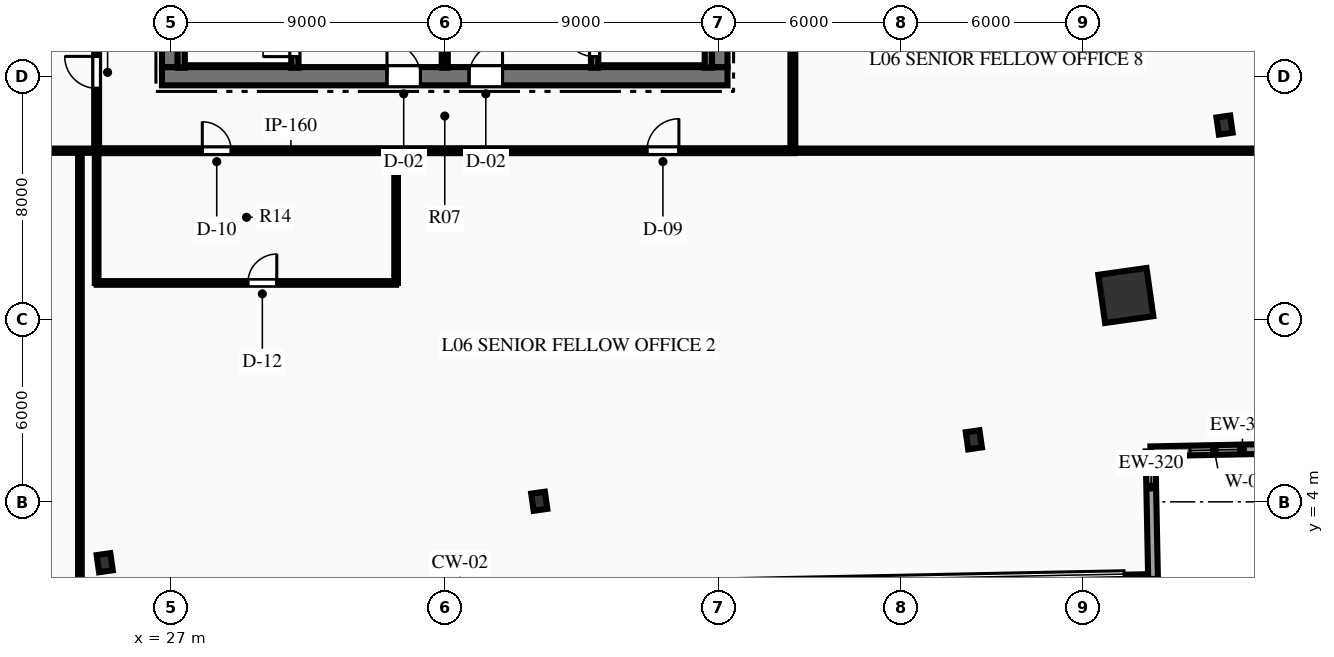
"""IFC4 building model, lengths in metres.
Left out: names, types, materials, properties, quantities, classifications, styles, units other than length and angle.
Written with IfcOpenShell. Run it as: python <this file> out.ifc"""

import sys

from ifc_helpers import new_model, si_unit, direction, frame, frame_2d, origin, origin_2d, place, context, subcontext, project, spatial, rectangle, hollow_rectangle, i_section, extrude, element, fill, save


model = new_model("IFC4")
c1 = context("Model", 3, precision=1e-05, world=origin(), true_north=direction((0.0, 1.0)))
c2 = subcontext(c1, "Body", "Model", "MODEL_VIEW")
j1 = project(units=[si_unit("LENGTHUNIT", "METRE"), si_unit("PLANEANGLEUNIT", "RADIAN")], contexts=[c1])
p1 = place(None, origin())
s1 = spatial("IfcSite", under=j1, at=p1, CompositionType="ELEMENT")
p2 = place(p1, origin())
s2 = spatial("IfcBuilding", under=s1, at=p2, CompositionType="ELEMENT")
p3 = place(p2, frame((0.0, 0.0, 32.7)))
s3 = spatial("IfcBuildingStorey", under=s2, at=p3, CompositionType="ELEMENT", Elevation=32.7)
p4 = place(p3, frame((26.7, 18.0, 0.0), z_axis=(0.0, 0.0, 1.0), x_axis=(1.0, 0.0, 0.0)))
e1 = element("IfcWall", 1, at=p4, inside=s3, PredefinedType="SHEAR", context=c2, shape_type="SweptSolid", body=[
    extrude(rectangle(XDim=18.6, YDim=0.6, at=frame_2d((9.3, 0.0))), origin(), (0.0, 0.0, 1.0), 3.75),
])
p5 = place(p4, frame((7.4, 0.0, 0.0)))
e2 = element("IfcOpeningElement", 2, at=p5, cuts=e1, PredefinedType="OPENING", context=c2, shape_type="SweptSolid", body=[
    extrude(rectangle(XDim=1.1, YDim=2.15, at=frame_2d((0.55, 1.075))), frame((0.0, 0.31, 0.0), z_axis=(0.0, -1.0, 0.0), x_axis=(1.0, 0.0, 0.0)), (0.0, 0.0, 1.0), 0.62),
])
p6 = place(p4, frame((10.1, 0.0, 0.0)))
e3 = element("IfcOpeningElement", 3, at=p6, cuts=e1, PredefinedType="OPENING", context=c2, shape_type="SweptSolid", body=[
    extrude(rectangle(XDim=1.1, YDim=2.15, at=frame_2d((0.55, 1.075))), frame((0.0, 0.31, 0.0), z_axis=(0.0, -1.0, 0.0), x_axis=(1.0, 0.0, 0.0)), (0.0, 0.0, 1.0), 0.62),
])
p7 = place(p3, frame((27.0, 18.3, 0.0), z_axis=(0.0, 0.0, 1.0), x_axis=(0.0, 1.0, 0.0)))
e4 = element("IfcWall", 4, at=p7, inside=s3, PredefinedType="SHEAR", context=c2, shape_type="SweptSolid", body=[
    extrude(rectangle(XDim=15.4, YDim=0.6, at=frame_2d((7.7, 0.0))), origin(), (0.0, 0.0, 1.0), 3.75),
])
p8 = place(p7, frame((9.94, 0.0, 0.0)))
e5 = element("IfcOpeningElement", 5, at=p8, cuts=e4, PredefinedType="OPENING", context=c2, shape_type="SweptSolid", body=[
    extrude(rectangle(XDim=1.4, YDim=2.2, at=frame_2d((0.7, 1.1))), frame((0.0, 0.31, 0.0), z_axis=(0.0, -1.0, 0.0), x_axis=(1.0, 0.0, 0.0)), (0.0, 0.0, 1.0), 0.62),
])
p9 = place(p3, frame((45.0, 18.3, 0.0), z_axis=(0.0, 0.0, 1.0), x_axis=(0.0, 1.0, 0.0)))
e6 = element("IfcWall", 6, at=p9, inside=s3, PredefinedType="SHEAR", context=c2, shape_type="SweptSolid", body=[
    extrude(rectangle(XDim=15.4, YDim=0.6, at=frame_2d((7.7, 0.0))), origin(), (0.0, 0.0, 1.0), 3.75),
])
p10 = place(p9, frame((9.94, 0.0, 0.0)))
e7 = element("IfcOpeningElement", 7, at=p10, cuts=e6, PredefinedType="OPENING", context=c2, shape_type="SweptSolid", body=[
    extrude(rectangle(XDim=1.4, YDim=2.2, at=frame_2d((0.7, 1.1))), frame((0.0, 0.31, 0.0), z_axis=(0.0, -1.0, 0.0), x_axis=(1.0, 0.0, 0.0)), (0.0, 0.0, 1.0), 0.62),
])
p11 = place(p3, frame((31.07, 18.28, 0.0), z_axis=(0.0, 0.0, 1.0), x_axis=(0.0, 1.0, 0.0)))
e8 = element("IfcWall", 8, at=p11, inside=s3, PredefinedType="SHEAR", context=c2, shape_type="SweptSolid", body=[
    extrude(rectangle(XDim=8.26, YDim=0.24, at=frame_2d((4.13, 0.0))), origin(), (0.0, 0.0, 1.0), 3.75),
])
p12 = place(p11, frame((0.365, 0.0, 0.0)))
e9 = element("IfcOpeningElement", 9, at=p12, cuts=e8, PredefinedType="OPENING", context=c2, shape_type="SweptSolid", body=[
    extrude(rectangle(XDim=1.05, YDim=2.15, at=frame_2d((0.525, 1.075))), frame((0.0, 0.13, 0.0), z_axis=(0.0, -1.0, 0.0), x_axis=(1.0, 0.0, 0.0)), (0.0, 0.0, 1.0), 0.26),
])
p13 = place(p3, frame((27.33, 18.28, 0.0), z_axis=(0.0, 0.0, 1.0), x_axis=(0.0, 1.0, 0.0)))
e10 = element("IfcWall", 10, at=p13, inside=s3, PredefinedType="SHEAR", context=c2, shape_type="SweptSolid", body=[
    extrude(rectangle(XDim=8.26, YDim=0.24, at=frame_2d((4.13, 0.0))), origin(), (0.0, 0.0, 1.0), 3.75),
])
p14 = place(p3, frame((40.93, 18.28, 0.0), z_axis=(0.0, 0.0, 1.0), x_axis=(0.0, 1.0, 0.0)))
e11 = element("IfcWall", 11, at=p14, inside=s3, PredefinedType="SHEAR", context=c2, shape_type="SweptSolid", body=[
    extrude(rectangle(XDim=8.26, YDim=0.24, at=frame_2d((4.13, 0.0))), origin(), (0.0, 0.0, 1.0), 3.75),
])
p15 = place(p14, frame((0.365, 0.0, 0.0)))
e12 = element("IfcOpeningElement", 12, at=p15, cuts=e11, PredefinedType="OPENING", context=c2, shape_type="SweptSolid", body=[
    extrude(rectangle(XDim=1.05, YDim=2.15, at=frame_2d((0.525, 1.075))), frame((0.0, 0.13, 0.0), z_axis=(0.0, -1.0, 0.0), x_axis=(1.0, 0.0, 0.0)), (0.0, 0.0, 1.0), 0.26),
])
p16 = place(p3, frame((44.67, 18.28, 0.0), z_axis=(0.0, 0.0, 1.0), x_axis=(0.0, 1.0, 0.0)))
e13 = element("IfcWall", 13, at=p16, inside=s3, PredefinedType="SHEAR", context=c2, shape_type="SweptSolid", body=[
    extrude(rectangle(XDim=8.26, YDim=0.24, at=frame_2d((4.13, 0.0))), origin(), (0.0, 0.0, 1.0), 3.75),
])
p17 = place(p3, frame((58.401, 10.787, 0.0), z_axis=(0.0, 0.0, 1.0), x_axis=(0.990146240249, 0.140037219771, 0.0)))
e14 = element("IfcColumn", 14, at=p17, inside=s3, PredefinedType="COLUMN", context=c2, shape_type="SweptSolid", body=[
    extrude(hollow_rectangle(XDim=1.6, YDim=1.6, WallThickness=0.08, at=origin_2d()), origin(), (0.0, 0.0, 1.0), 3.75),
])
for number, where, z_axis, x_axis in (
    (15, (24.815, 1.997, 0.0), (0.0, 0.0, 1.0), (0.99, 0.14, 0.0)),
    (16, (39.109, 4.019, 0.0), (0.0, 0.0, 1.0), (0.99, 0.14, 0.0)),
    (17, (53.403, 6.04, 0.0), (0.0, 0.0, 1.0), (0.99, 0.14, 0.0)),
    (18, (61.648, 16.393, 0.0), (0.0, 0.0, 1.0), (0.99, 0.14, 0.0)),
):
    element("IfcColumn", number, at=place(p3, frame(where, z_axis=z_axis, x_axis=x_axis)), inside=s3, PredefinedType="COLUMN", context=c2, shape_type="SweptSolid", body=[
        extrude(i_section(OverallWidth=0.454, OverallDepth=0.569, WebThickness=0.078, FlangeThickness=0.125, at=origin_2d()), origin(), (0.0, 0.0, 1.0), 3.75),
    ])
p18 = place(p3, frame((59.297, 1.463, 0.0), z_axis=(0.0, 0.0, 1.0), x_axis=(-0.999798429426, -0.020077363305, 0.0)))
e19 = element("IfcWall", 19, at=p18, inside=s3, PredefinedType="STANDARD", context=c2, shape_type="SweptSolid", body=[
    extrude(rectangle(XDim=0.9, YDim=0.32, at=frame_2d((0.45, 0.0))), origin(), (0.0, 0.0, 1.0), 3.44),
])
p19 = place(p3, frame((59.213, 5.662, 0.0), z_axis=(0.0, 0.0, 1.0), x_axis=(0.020054105767, -0.9997988962, 0.0)))
e20 = element("IfcWall", 20, at=p19, inside=s3, PredefinedType="STANDARD", context=c2, shape_type="SweptSolid", body=[
    extrude(rectangle(XDim=4.2, YDim=0.32, at=frame_2d((2.1, 0.0))), origin(), (0.0, 0.0, 1.0), 3.44),
])
p20 = place(p3, frame((63.412, 5.746, 0.0), z_axis=(0.0, 0.0, 1.0), x_axis=(-0.9997988962, -0.020054105767, 0.0)))
e21 = element("IfcWall", 21, at=p20, inside=s3, PredefinedType="STANDARD", context=c2, shape_type="SweptSolid", body=[
    extrude(rectangle(XDim=4.2, YDim=0.32, at=frame_2d((2.1, 0.0))), origin(), (0.0, 0.0, 1.0), 3.44),
])
p21 = place(p20, frame((1.3, 0.0, 0.85)))
e22 = element("IfcOpeningElement", 22, at=p21, cuts=e21, PredefinedType="OPENING", context=c2, shape_type="SweptSolid", body=[
    extrude(rectangle(XDim=1.6, YDim=2.1, at=frame_2d((0.8, 1.05))), frame((0.0, 0.17, 0.0), z_axis=(0.0, -1.0, 0.0), x_axis=(1.0, 0.0, 0.0)), (0.0, 0.0, 1.0), 0.34),
])
p22 = place(p3, frame((36.0, 18.28, 0.0), z_axis=(0.0, 0.0, 1.0), x_axis=(0.0, 1.0, 0.0)))
e23 = element("IfcWall", 23, at=p22, inside=s3, PredefinedType="PARTITIONING", context=c2, shape_type="SweptSolid", body=[
    extrude(rectangle(XDim=3.77, YDim=0.2, at=frame_2d((1.885, 0.0))), origin(), (0.0, 0.0, 1.0), 3.44),
])
p23 = place(p3, frame((24.5, 15.55, 0.0), z_axis=(0.0, 0.0, 1.0), x_axis=(1.0, 0.0, 0.0)))
e24 = element("IfcWall", 24, at=p23, inside=s3, PredefinedType="PARTITIONING", context=c2, shape_type="SweptSolid", body=[
    extrude(rectangle(XDim=23.0, YDim=0.16, at=frame_2d((11.5, 0.0))), origin(), (0.0, 0.0, 1.0), 3.44),
])
p24 = place(p23, frame((3.525, 0.0, 0.0)))
e25 = element("IfcOpeningElement", 25, at=p24, cuts=e24, PredefinedType="OPENING", context=c2, shape_type="SweptSolid", body=[
    extrude(rectangle(XDim=0.95, YDim=2.15, at=frame_2d((0.475, 1.075))), frame((0.0, 0.09, 0.0), z_axis=(0.0, -1.0, 0.0), x_axis=(1.0, 0.0, 0.0)), (0.0, 0.0, 1.0), 0.18),
])
p25 = place(p23, frame((18.151, 0.0, 0.0)))
e26 = element("IfcOpeningElement", 26, at=p25, cuts=e24, PredefinedType="OPENING", context=c2, shape_type="SweptSolid", body=[
    extrude(rectangle(XDim=1.05, YDim=2.15, at=frame_2d((0.525, 1.075))), frame((0.0, 0.09, 0.0), z_axis=(0.0, -1.0, 0.0), x_axis=(1.0, 0.0, 0.0)), (0.0, 0.0, 1.0), 0.18),
])
p26 = place(p3, frame((24.55, 15.55, 0.0), z_axis=(0.0, 0.0, 1.0), x_axis=(0.0, 1.0, 0.0)))
e27 = element("IfcWall", 27, at=p26, inside=s3, PredefinedType="PARTITIONING", context=c2, shape_type="SweptSolid", body=[
    extrude(rectangle(XDim=20.9, YDim=0.16, at=frame_2d((10.45, 0.0))), origin(), (0.0, 0.0, 1.0), 3.44),
])
p27 = place(p26, frame((2.052, 0.0, 0.0)))
e28 = element("IfcOpeningElement", 28, at=p27, cuts=e27, PredefinedType="OPENING", context=c2, shape_type="SweptSolid", body=[
    extrude(rectangle(XDim=1.05, YDim=2.15, at=frame_2d((0.525, 1.075))), frame((0.0, 0.09, 0.0), z_axis=(0.0, -1.0, 0.0), x_axis=(1.0, 0.0, 0.0)), (0.0, 0.0, 1.0), 0.18),
])
p28 = place(p26, frame((15.645, 0.0, 0.0)))
e29 = element("IfcOpeningElement", 29, at=p28, cuts=e27, PredefinedType="OPENING", context=c2, shape_type="SweptSolid", body=[
    extrude(rectangle(XDim=1.05, YDim=2.15, at=frame_2d((0.525, 1.075))), frame((0.0, 0.09, 0.0), z_axis=(0.0, -1.0, 0.0), x_axis=(1.0, 0.0, 0.0)), (0.0, 0.0, 1.0), 0.18),
])
p29 = place(p3, frame((47.45, 15.55, 0.0), z_axis=(0.0, 0.0, 1.0), x_axis=(0.0, 1.0, 0.0)))
e30 = element("IfcWall", 30, at=p29, inside=s3, PredefinedType="PARTITIONING", context=c2, shape_type="SweptSolid", body=[
    extrude(rectangle(XDim=20.9, YDim=0.16, at=frame_2d((10.45, 0.0))), origin(), (0.0, 0.0, 1.0), 3.44),
])
p30 = place(p29, frame((3.747, 0.0, 0.0)))
e31 = element("IfcOpeningElement", 31, at=p30, cuts=e30, PredefinedType="OPENING", context=c2, shape_type="SweptSolid", body=[
    extrude(rectangle(XDim=1.05, YDim=2.15, at=frame_2d((0.525, 1.075))), frame((0.0, 0.09, 0.0), z_axis=(0.0, -1.0, 0.0), x_axis=(1.0, 0.0, 0.0)), (0.0, 0.0, 1.0), 0.18),
])
p31 = place(p29, frame((7.865, 0.0, 0.0)))
e32 = element("IfcOpeningElement", 32, at=p31, cuts=e30, PredefinedType="OPENING", context=c2, shape_type="SweptSolid", body=[
    extrude(rectangle(XDim=1.05, YDim=2.15, at=frame_2d((0.525, 1.075))), frame((0.0, 0.09, 0.0), z_axis=(0.0, -1.0, 0.0), x_axis=(1.0, 0.0, 0.0)), (0.0, 0.0, 1.0), 0.18),
])
p32 = place(p29, frame((18.045, 0.0, 0.0)))
e33 = element("IfcOpeningElement", 33, at=p32, cuts=e30, PredefinedType="OPENING", context=c2, shape_type="SweptSolid", body=[
    extrude(rectangle(XDim=1.05, YDim=2.15, at=frame_2d((0.525, 1.075))), frame((0.0, 0.09, 0.0), z_axis=(0.0, -1.0, 0.0), x_axis=(1.0, 0.0, 0.0)), (0.0, 0.0, 1.0), 0.18),
])
p33 = place(p3, frame((9.244, 15.55, 0.0), z_axis=(0.0, 0.0, 1.0), x_axis=(1.0, 0.0, 0.0)))
e34 = element("IfcWall", 34, at=p33, inside=s3, PredefinedType="PARTITIONING", context=c2, shape_type="SweptSolid", body=[
    extrude(rectangle(XDim=15.306, YDim=0.14, at=frame_2d((7.653, 0.0))), origin(), (0.0, 0.0, 1.0), 3.44),
])
p34 = place(p33, frame((10.175, 0.0, 0.0)))
e35 = element("IfcOpeningElement", 35, at=p34, cuts=e34, PredefinedType="OPENING", context=c2, shape_type="SweptSolid", body=[
    extrude(rectangle(XDim=0.95, YDim=2.15, at=frame_2d((0.475, 1.075))), frame((0.0, 0.08, 0.0), z_axis=(0.0, -1.0, 0.0), x_axis=(1.0, 0.0, 0.0)), (0.0, 0.0, 1.0), 0.16),
])
p35 = place(p3, frame((47.45, 15.55, 0.0), z_axis=(0.0, 0.0, 1.0), x_axis=(1.0, 0.0, 0.0)))
e36 = element("IfcWall", 36, at=p35, inside=s3, PredefinedType="PARTITIONING", context=c2, shape_type="SweptSolid", body=[
    extrude(rectangle(XDim=15.725, YDim=0.14, at=frame_2d((7.863, 0.0))), origin(), (0.0, 0.0, 1.0), 3.44),
])
p36 = place(p3, frame((24.0, 0.794, 0.0), z_axis=(0.0, 0.0, 1.0), x_axis=(0.0, 1.0, 0.0)))
e37 = element("IfcWall", 37, at=p36, inside=s3, PredefinedType="PARTITIONING", context=c2, shape_type="SweptSolid", body=[
    extrude(rectangle(XDim=14.756, YDim=0.12, at=frame_2d((7.378, 0.0))), origin(), (0.0, 0.0, 1.0), 3.44),
])
p37 = place(p3, frame((24.55, 11.2, 0.0), z_axis=(0.0, 0.0, 1.0), x_axis=(0.0, 1.0, 0.0)))
e38 = element("IfcWall", 38, at=p37, inside=s3, PredefinedType="PARTITIONING", context=c2, shape_type="SweptSolid", body=[
    extrude(rectangle(XDim=4.35, YDim=0.12, at=frame_2d((2.175, 0.0))), origin(), (0.0, 0.0, 1.0), 3.44),
])
p38 = place(p3, frame((24.55, 11.2, 0.0), z_axis=(0.0, 0.0, 1.0), x_axis=(1.0, 0.0, 0.0)))
e39 = element("IfcWall", 39, at=p38, inside=s3, PredefinedType="PARTITIONING", context=c2, shape_type="SweptSolid", body=[
    extrude(rectangle(XDim=9.85, YDim=0.12, at=frame_2d((4.925, 0.0))), origin(), (0.0, 0.0, 1.0), 3.44),
])
p39 = place(p38, frame((4.975, 0.0, 0.0)))
e40 = element("IfcOpeningElement", 40, at=p39, cuts=e39, PredefinedType="OPENING", context=c2, shape_type="SweptSolid", body=[
    extrude(rectangle(XDim=0.95, YDim=2.15, at=frame_2d((0.475, 1.075))), frame((0.0, 0.07, 0.0), z_axis=(0.0, -1.0, 0.0), x_axis=(1.0, 0.0, 0.0)), (0.0, 0.0, 1.0), 0.14),
])
p40 = place(p3, frame((34.4, 11.2, 0.0), z_axis=(0.0, 0.0, 1.0), x_axis=(0.0, 1.0, 0.0)))
e41 = element("IfcWall", 41, at=p40, inside=s3, PredefinedType="PARTITIONING", context=c2, shape_type="SweptSolid", body=[
    extrude(rectangle(XDim=4.35, YDim=0.12, at=frame_2d((2.175, 0.0))), origin(), (0.0, 0.0, 1.0), 3.44),
])
p41 = place(p21, origin())
e42 = element("IfcWindow", 42, at=p41, inside=s3, PartitioningType="SINGLE_PANEL", PredefinedType="WINDOW", context=c2, shape_type="SweptSolid", body=[
    extrude(rectangle(XDim=1.6, YDim=2.1, at=frame_2d((0.8, 1.05))), frame((0.0, 0.03, 0.0), z_axis=(0.0, -1.0, 0.0), x_axis=(1.0, 0.0, 0.0)), (0.0, 0.0, 1.0), 0.06),
])
fill(e22, e42)
p42 = place(p12, origin())
e43 = element("IfcDoor", 43, at=p42, inside=s3, OperationType="SINGLE_SWING_LEFT", PredefinedType="DOOR", context=c2, shape_type="SweptSolid", body=[
    extrude(rectangle(XDim=1.05, YDim=2.15, at=frame_2d((0.525, 1.075))), frame((0.0, 0.025, 0.0), z_axis=(0.0, -1.0, 0.0), x_axis=(1.0, 0.0, 0.0)), (0.0, 0.0, 1.0), 0.05),
])
fill(e9, e43)
p43 = place(p15, origin())
e44 = element("IfcDoor", 44, at=p43, inside=s3, OperationType="SINGLE_SWING_RIGHT", PredefinedType="DOOR", context=c2, shape_type="SweptSolid", body=[
    extrude(rectangle(XDim=1.05, YDim=2.15, at=frame_2d((0.525, 1.075))), frame((0.0, 0.025, 0.0), z_axis=(0.0, -1.0, 0.0), x_axis=(1.0, 0.0, 0.0)), (0.0, 0.0, 1.0), 0.05),
])
fill(e12, e44)
p44 = place(p5, origin())
e45 = element("IfcDoor", 45, at=p44, inside=s3, OperationType="SINGLE_SWING_LEFT", PredefinedType="DOOR", context=c2, shape_type="SweptSolid", body=[
    extrude(rectangle(XDim=1.1, YDim=2.15, at=frame_2d((0.55, 1.075))), frame((0.0, 0.025, 0.0), z_axis=(0.0, -1.0, 0.0), x_axis=(1.0, 0.0, 0.0)), (0.0, 0.0, 1.0), 0.05),
])
fill(e2, e45)
p45 = place(p6, origin())
e46 = element("IfcDoor", 46, at=p45, inside=s3, OperationType="SINGLE_SWING_RIGHT", PredefinedType="DOOR", context=c2, shape_type="SweptSolid", body=[
    extrude(rectangle(XDim=1.1, YDim=2.15, at=frame_2d((0.55, 1.075))), frame((0.0, 0.025, 0.0), z_axis=(0.0, -1.0, 0.0), x_axis=(1.0, 0.0, 0.0)), (0.0, 0.0, 1.0), 0.05),
])
fill(e3, e46)
p46 = place(p24, origin())
e47 = element("IfcDoor", 47, at=p46, inside=s3, OperationType="SINGLE_SWING_LEFT", PredefinedType="DOOR", context=c2, shape_type="SweptSolid", body=[
    extrude(rectangle(XDim=0.95, YDim=2.15, at=frame_2d((0.475, 1.075))), frame((0.0, 0.025, 0.0), z_axis=(0.0, -1.0, 0.0), x_axis=(1.0, 0.0, 0.0)), (0.0, 0.0, 1.0), 0.05),
])
fill(e25, e47)
p47 = place(p39, origin())
e48 = element("IfcDoor", 48, at=p47, inside=s3, OperationType="SINGLE_SWING_RIGHT", PredefinedType="DOOR", context=c2, shape_type="SweptSolid", body=[
    extrude(rectangle(XDim=0.95, YDim=2.15, at=frame_2d((0.475, 1.075))), frame((0.0, 0.025, 0.0), z_axis=(0.0, -1.0, 0.0), x_axis=(1.0, 0.0, 0.0)), (0.0, 0.0, 1.0), 0.05),
])
fill(e40, e48)
p48 = place(p25, origin())
e49 = element("IfcDoor", 49, at=p48, inside=s3, OperationType="SINGLE_SWING_RIGHT", PredefinedType="DOOR", context=c2, shape_type="SweptSolid", body=[
    extrude(rectangle(XDim=1.05, YDim=2.15, at=frame_2d((0.525, 1.075))), frame((0.0, 0.025, 0.0), z_axis=(0.0, -1.0, 0.0), x_axis=(1.0, 0.0, 0.0)), (0.0, 0.0, 1.0), 0.05),
])
fill(e26, e49)
p49 = place(p27, origin())
e50 = element("IfcDoor", 50, at=p49, inside=s3, OperationType="SINGLE_SWING_RIGHT", PredefinedType="DOOR", context=c2, shape_type="SweptSolid", body=[
    extrude(rectangle(XDim=1.05, YDim=2.15, at=frame_2d((0.525, 1.075))), frame((0.0, 0.025, 0.0), z_axis=(0.0, -1.0, 0.0), x_axis=(1.0, 0.0, 0.0)), (0.0, 0.0, 1.0), 0.05),
])
fill(e28, e50)
save(model, sys.argv[1])
